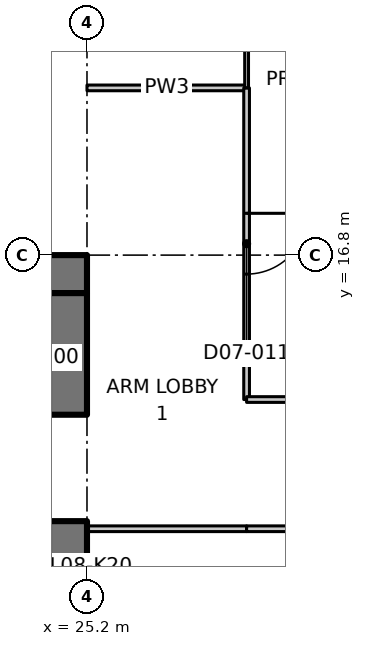
"""IFC4 building model, lengths in metres.
Left out: names, types, materials, properties, quantities, classifications, styles, units other than length and angle.
Written with IfcOpenShell. Run it as: python <this file> out.ifc"""

import sys

from ifc_helpers import new_model, si_unit, direction, frame, frame_2d, origin, place, context, subcontext, project, spatial, polyline, rectangle, outline, extrude, element, fill, save


model = new_model("IFC4")
c1 = context("Model", 3, precision=1e-05, world=origin(), true_north=direction((0.0, 1.0)))
c2 = subcontext(c1, "Body", "Model", "MODEL_VIEW")
j1 = project(units=[si_unit("LENGTHUNIT", "METRE"), si_unit("PLANEANGLEUNIT", "RADIAN")], contexts=[c1])
p1 = place(None, origin())
s1 = spatial("IfcSite", under=j1, at=p1, CompositionType="ELEMENT")
p2 = place(p1, origin())
s2 = spatial("IfcBuilding", under=s1, at=p2, CompositionType="ELEMENT")
p3 = place(p2, frame((0.0, 0.0, 43.7)))
s3 = spatial("IfcBuildingStorey", under=s2, at=p3, CompositionType="ELEMENT", Elevation=43.7)
p4 = place(p3, frame((23.8, 16.3, 0.0), z_axis=(0.0, 0.0, 1.0), x_axis=(1.0, 0.0, 0.0)))
e1 = element("IfcWall", 1, at=p4, inside=s3, PredefinedType="SHEAR", context=c2, shape_type="SweptSolid", body=[
    extrude(rectangle(XDim=1.4, YDim=1.0, at=frame_2d((0.7, 0.0))), origin(), (0.0, 0.0, 1.0), 3.35),
])
p5 = place(p3, frame((24.7, 1.0, 0.0), z_axis=(0.0, 0.0, 1.0), x_axis=(0.0, 1.0, 0.0)))
e2 = element("IfcWall", 2, at=p5, inside=s3, PredefinedType="SHEAR", context=c2, shape_type="SweptSolid", body=[
    extrude(rectangle(XDim=8.8, YDim=1.0, at=frame_2d((4.4, 0.0))), origin(), (0.0, 0.0, 1.0), 3.35),
])
p6 = place(p3, frame((24.7, 12.6, 0.0), z_axis=(0.0, 0.0, 1.0), x_axis=(0.0, 1.0, 0.0)))
e3 = element("IfcWall", 3, at=p6, inside=s3, PredefinedType="SHEAR", context=c2, shape_type="SweptSolid", body=[
    extrude(rectangle(XDim=3.2, YDim=1.0, at=frame_2d((1.6, 0.0))), origin(), (0.0, 0.0, 1.0), 3.35),
])
for number, where, z_axis, x_axis in (
    (4, (25.2, 21.2, 0.0), (0.0, 0.0, 1.0), (1.0, 0.0, 0.0)),
    (5, (29.4, 9.6, 0.0), (0.0, 0.0, 1.0), (-1.0, 0.0, 0.0)),
):
    element("IfcWall", number, at=place(p3, frame(where, z_axis=z_axis, x_axis=x_axis)), inside=s3, PredefinedType="PARTITIONING", context=c2, shape_type="SweptSolid", body=[
        extrude(rectangle(XDim=4.2, YDim=0.15, at=frame_2d((2.1, 0.0))), origin(), (0.0, 0.0, 1.0), 3.33),
    ])
p7 = place(p3, frame((29.4, 21.2, 0.0), z_axis=(0.0, 0.0, 1.0), x_axis=(0.0, -1.0, 0.0)))
e6 = element("IfcWall", 6, at=p7, inside=s3, PredefinedType="PARTITIONING", context=c2, shape_type="SweptSolid", body=[
    extrude(rectangle(XDim=8.2, YDim=0.15, at=frame_2d((4.1, 0.0))), origin(), (0.0, 0.0, 1.0), 3.33),
])
p8 = place(p7, frame((3.3, 0.0, 0.0)))
e7 = element("IfcOpeningElement", 7, at=p8, cuts=e6, PredefinedType="OPENING", context=c2, shape_type="SweptSolid", body=[
    extrude(rectangle(XDim=1.6, YDim=2.1, at=frame_2d((0.8, 1.05))), frame((0.0, 0.085, 0.0), z_axis=(0.0, -1.0, 0.0), x_axis=(1.0, 0.0, 0.0)), (0.0, 0.0, 1.0), 0.17),
])
p9 = place(p3, frame((29.4, 27.429, 0.0), z_axis=(0.0, 0.0, 1.0), x_axis=(0.0, -1.0, 0.0)))
e8 = element("IfcWall", 8, at=p9, inside=s3, PredefinedType="PARTITIONING", context=c2, shape_type="SweptSolid", body=[
    extrude(outline(polyline([(0.0, 0.0), (6.229, 0.0), (6.229, 3.33), (2.679, 3.33), (2.677, 2.98), (1.781, 2.98), (1.779, 3.33), (0.154, 3.33), (0.0, 3.33), (0.0, 0.0)])), frame((0.0, 0.05, 0.0), z_axis=(0.0, -1.0, 0.0), x_axis=(1.0, 0.0, 0.0)), (0.0, 0.0, 1.0), 0.1),
])
p10 = place(p3, frame((33.6, 9.6, 0.0), z_axis=(0.0, 0.0, 1.0), x_axis=(-1.0, 0.0, 0.0)))
e9 = element("IfcWall", 9, at=p10, inside=s3, PredefinedType="PARTITIONING", context=c2, shape_type="SweptSolid", body=[
    extrude(rectangle(XDim=4.2, YDim=0.15, at=frame_2d((2.1, 0.0))), origin(), (0.0, 0.0, 1.0), 3.33),
])
p11 = place(p10, frame((1.2, 0.0, 0.0)))
e10 = element("IfcOpeningElement", 10, at=p11, cuts=e9, PredefinedType="OPENING", context=c2, shape_type="SweptSolid", body=[
    extrude(rectangle(XDim=1.6, YDim=2.1, at=frame_2d((0.8, 1.05))), frame((0.0, 0.085, 0.0), z_axis=(0.0, -1.0, 0.0), x_axis=(1.0, 0.0, 0.0)), (0.0, 0.0, 1.0), 0.17),
])
p12 = place(p3, frame((29.4, 13.0, 0.0), z_axis=(0.0, 0.0, 1.0), x_axis=(1.0, 0.0, 0.0)))
e11 = element("IfcWall", 11, at=p12, inside=s3, PredefinedType="PARTITIONING", context=c2, shape_type="SweptSolid", body=[
    extrude(rectangle(XDim=4.2, YDim=0.15, at=frame_2d((2.1, 0.0))), origin(), (0.0, 0.0, 1.0), 3.33),
])
p13 = place(p8, origin())
e12 = element("IfcDoor", 12, at=p13, inside=s3, OperationType="DOUBLE_DOOR_SINGLE_SWING", PredefinedType="DOOR", context=c2, shape_type="SweptSolid", body=[
    extrude(rectangle(XDim=1.6, YDim=2.1, at=frame_2d((0.8, 1.05))), frame((0.0, 0.025, 0.0), z_axis=(0.0, -1.0, 0.0), x_axis=(1.0, 0.0, 0.0)), (0.0, 0.0, 1.0), 0.05),
])
fill(e7, e12)
save(model, sys.argv[1])
